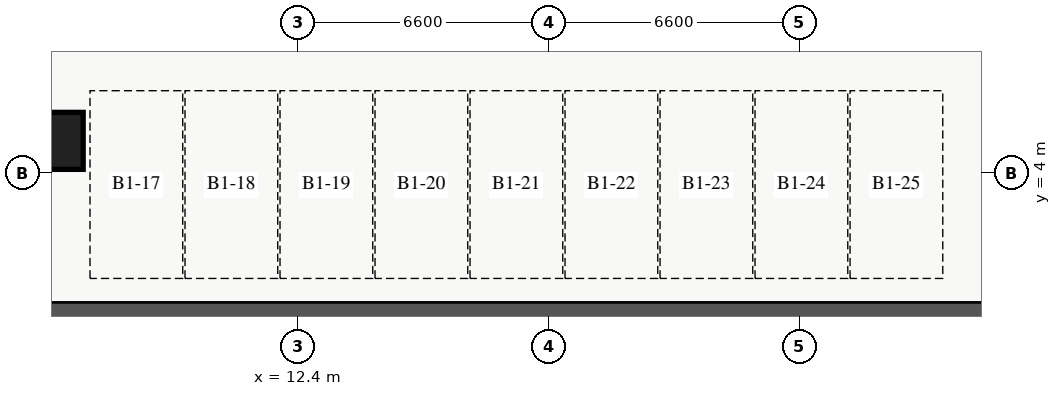
"""IFC4 building model, lengths in metres.
Left out: names, types, materials, properties, quantities, classifications, styles, units other than length and angle.
Written with IfcOpenShell. Run it as: python <this file> out.ifc"""

import sys

from ifc_helpers import new_model, si_unit, direction, frame, frame_2d, origin, origin_2d, place, context, subcontext, project, spatial, rectangle, extrude, source, transform, mapped, element, save


model = new_model("IFC4")
c1 = context("Model", 3, precision=1e-05, world=origin(), true_north=direction((0.0, 1.0)))
c2 = subcontext(c1, "Body", "Model", "MODEL_VIEW")
j1 = project(units=[si_unit("LENGTHUNIT", "METRE"), si_unit("PLANEANGLEUNIT", "RADIAN")], contexts=[c1])
p1 = place(None, origin())
s1 = spatial("IfcSite", under=j1, at=p1, CompositionType="ELEMENT")
p2 = place(p1, origin())
s2 = spatial("IfcBuilding", under=s1, at=p2, CompositionType="ELEMENT")
p3 = place(p2, frame((0.0, 0.0, -4.8)))
s3 = spatial("IfcBuildingStorey", under=s2, at=p3, CompositionType="ELEMENT", Elevation=-4.8)
p4 = place(p3, frame((0.0, 0.3, 0.0), z_axis=(0.0, 0.0, 1.0), x_axis=(1.0, 0.0, 0.0)))
e1 = element("IfcWall", 1, at=p4, inside=s3, PredefinedType="SOLIDWALL", context=c2, shape_type="SweptSolid", body=[
    extrude(rectangle(XDim=74.0, YDim=0.6, at=frame_2d((37.0, 0.0))), origin(), (0.0, 0.0, 1.0), 4.8),
])
m1 = source(origin(), c2, "Body", "SweptSolid", [
    extrude(rectangle(XDim=1.5, YDim=1.5, at=origin_2d()), origin(), (0.0, 0.0, 1.0), 4.8),
])
p5 = place(p3, frame((6.0, 4.85, 0.0), z_axis=(0.0, 0.0, 1.0), x_axis=(1.0, 0.0, 0.0)))
e2 = element("IfcColumn", 2, at=p5, inside=s3, PredefinedType="COLUMN", context=c2, shape_type="MappedRepresentation", body=[
    mapped(m1, transform((0.0, 0.0, 0.0), x_axis=(1.0, 0.0, 0.0), y_axis=(0.0, 1.0, 0.0), z_axis=(0.0, 0.0, 1.0), scale=1.0)),
])
save(model, sys.argv[1])
